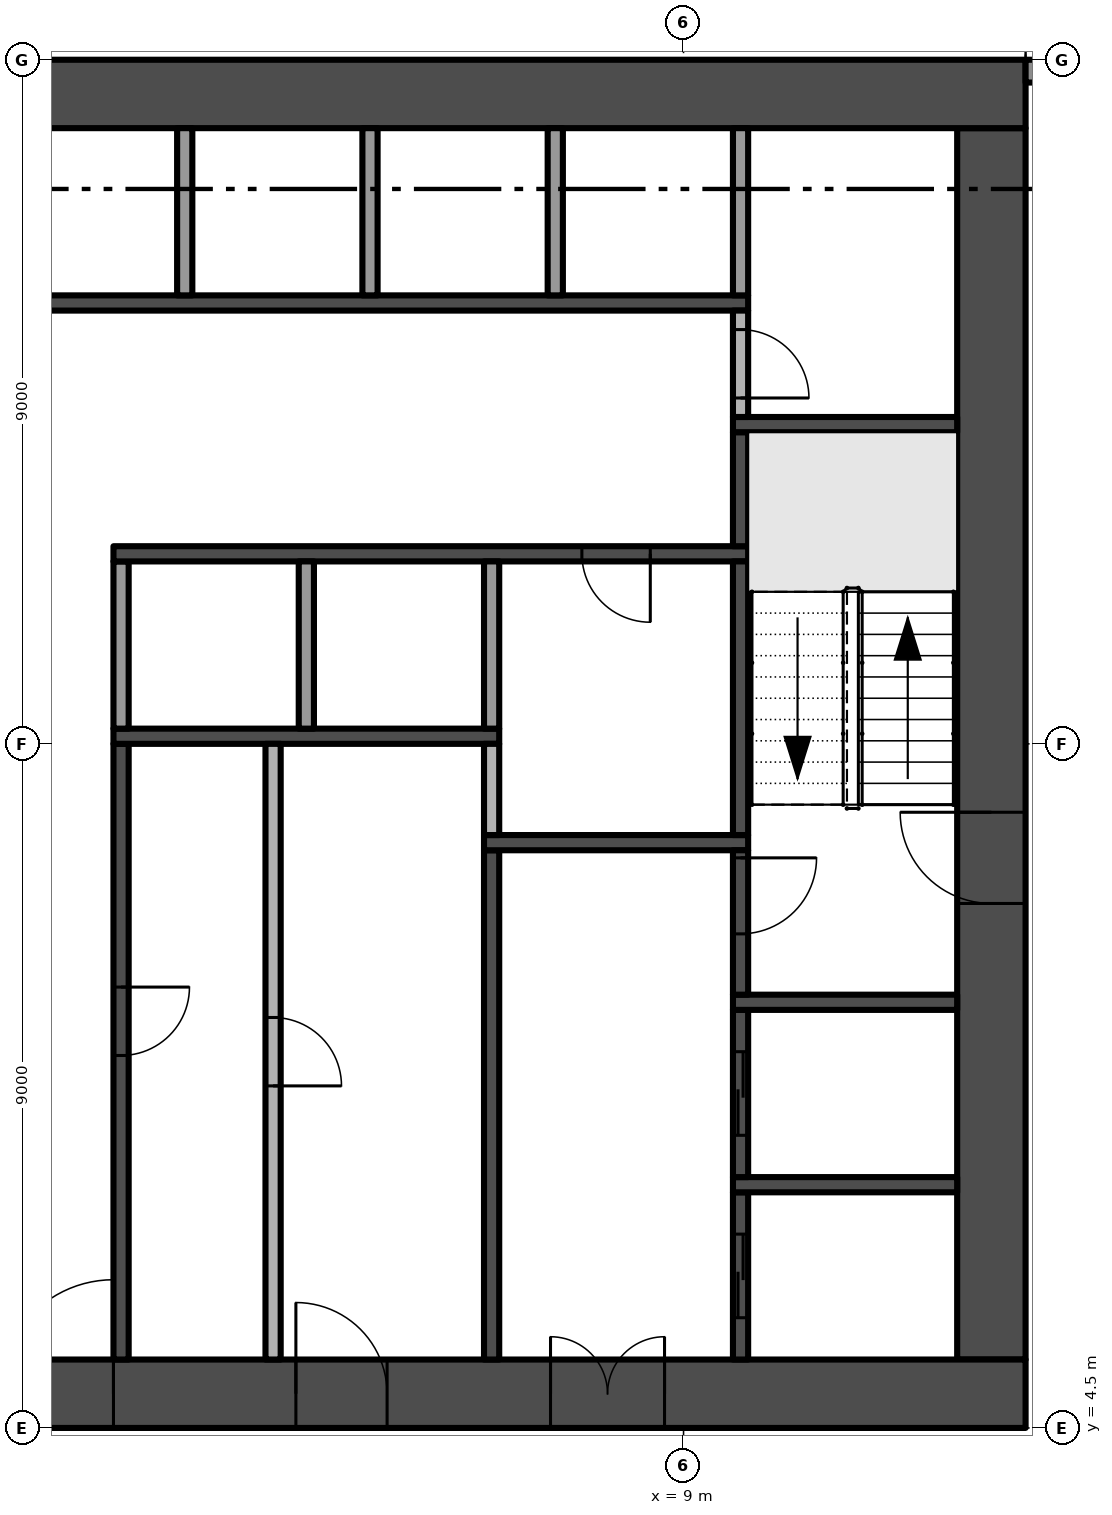
"""IFC4 building model, lengths in metres.
Left out: names, types, materials, properties, quantities, classifications, styles, units other than length and angle.
Written with IfcOpenShell. Run it as: python <this file> out.ifc"""

import sys

from ifc_helpers import new_model, si_unit, direction, frame, frame_2d, origin, place, context, subcontext, project, spatial, rectangle, extrude, element, fill, save


model = new_model("IFC4")
c1 = context("Model", 3, precision=1e-05, world=origin(), true_north=direction((0.0, 1.0)))
c2 = subcontext(c1, "Body", "Model", "MODEL_VIEW")
j1 = project(units=[si_unit("LENGTHUNIT", "METRE"), si_unit("PLANEANGLEUNIT", "RADIAN")], contexts=[c1])
p1 = place(None, origin())
s1 = spatial("IfcSite", under=j1, at=p1, CompositionType="ELEMENT")
p2 = place(p1, origin())
s2 = spatial("IfcBuilding", under=s1, at=p2, CompositionType="ELEMENT")
p3 = place(p2, frame((0.0, 0.0, 92.2)))
s3 = spatial("IfcBuildingStorey", under=s2, at=p3, CompositionType="ELEMENT", Elevation=92.2)
p4 = place(p3, frame((-13.5, 4.95, -0.3), z_axis=(0.0, 0.0, 1.0), x_axis=(1.0, 0.0, 0.0)))
e1 = element("IfcWall", 1, at=p4, inside=s3, PredefinedType="SHEAR", context=c2, shape_type="SweptSolid", body=[
    extrude(rectangle(XDim=27.0, YDim=0.9, at=frame_2d((13.5, 0.0))), origin(), (0.0, 0.0, 1.0), 3.8),
])
p5 = place(p4, frame((12.0, 0.0, 0.3)))
e2 = element("IfcOpeningElement", 2, at=p5, cuts=e1, PredefinedType="OPENING", context=c2, shape_type="SweptSolid", body=[
    extrude(rectangle(XDim=3.0, YDim=2.4, at=frame_2d((1.5, 1.2))), frame((0.0, 0.46, 0.0), z_axis=(0.0, -1.0, 0.0), x_axis=(1.0, 0.0, 0.0)), (0.0, 0.0, 1.0), 0.92),
])
p6 = place(p4, frame((4.9, 0.0, 0.3)))
e3 = element("IfcOpeningElement", 3, at=p6, cuts=e1, PredefinedType="OPENING", context=c2, shape_type="SweptSolid", body=[
    extrude(rectangle(XDim=1.2, YDim=2.2, at=frame_2d((0.6, 1.1))), frame((0.0, 0.46, 0.0), z_axis=(0.0, -1.0, 0.0), x_axis=(1.0, 0.0, 0.0)), (0.0, 0.0, 1.0), 0.92),
])
p7 = place(p4, frame((20.75, 0.0, 0.3)))
e4 = element("IfcOpeningElement", 4, at=p7, cuts=e1, PredefinedType="OPENING", context=c2, shape_type="SweptSolid", body=[
    extrude(rectangle(XDim=1.5, YDim=2.2, at=frame_2d((0.75, 1.1))), frame((0.0, 0.46, 0.0), z_axis=(0.0, -1.0, 0.0), x_axis=(1.0, 0.0, 0.0)), (0.0, 0.0, 1.0), 0.92),
])
p8 = place(p4, frame((17.4, 0.0, 0.3)))
e5 = element("IfcOpeningElement", 5, at=p8, cuts=e1, PredefinedType="OPENING", context=c2, shape_type="SweptSolid", body=[
    extrude(rectangle(XDim=1.2, YDim=2.2, at=frame_2d((0.6, 1.1))), frame((0.0, 0.46, 0.0), z_axis=(0.0, -1.0, 0.0), x_axis=(1.0, 0.0, 0.0)), (0.0, 0.0, 1.0), 0.92),
])
p9 = place(p3, frame((13.05, 5.4, -0.3), z_axis=(0.0, 0.0, 1.0), x_axis=(0.0, 1.0, 0.0)))
e6 = element("IfcWall", 6, at=p9, inside=s3, PredefinedType="SHEAR", context=c2, shape_type="SweptSolid", body=[
    extrude(rectangle(XDim=16.2, YDim=0.9, at=frame_2d((8.1, 0.0))), origin(), (0.0, 0.0, 1.0), 3.8),
])
p10 = place(p9, frame((6.0, 0.0, 0.3)))
e7 = element("IfcOpeningElement", 7, at=p10, cuts=e6, PredefinedType="OPENING", context=c2, shape_type="SweptSolid", body=[
    extrude(rectangle(XDim=1.2, YDim=2.2, at=frame_2d((0.6, 1.1))), frame((0.0, 0.46, 0.0), z_axis=(0.0, -1.0, 0.0), x_axis=(1.0, 0.0, 0.0)), (0.0, 0.0, 1.0), 0.92),
])
p11 = place(p3, frame((13.5, 22.05, -0.3), z_axis=(0.0, 0.0, 1.0), x_axis=(-1.0, 0.0, 0.0)))
e8 = element("IfcWall", 8, at=p11, inside=s3, PredefinedType="SHEAR", context=c2, shape_type="SweptSolid", body=[
    extrude(rectangle(XDim=27.0, YDim=0.9, at=frame_2d((13.5, 0.0))), origin(), (0.0, 0.0, 1.0), 3.8),
])
p12 = place(p3, frame((13.5, 22.35, 0.0), z_axis=(0.0, 0.0, 1.0), x_axis=(1.0, 0.0, 0.0)))
e9 = element("IfcWall", 9, at=p12, inside=s3, PredefinedType="SOLIDWALL", context=c2, shape_type="SweptSolid", body=[
    extrude(rectangle(XDim=3.85, YDim=0.3, at=frame_2d((1.925, 0.0))), origin(), (0.0, 0.0, 1.0), 3.5),
])
p13 = place(p12, frame((0.775, 0.0, 0.0)))
e10 = element("IfcOpeningElement", 10, at=p13, cuts=e9, PredefinedType="OPENING", context=c2, shape_type="SweptSolid", body=[
    extrude(rectangle(XDim=2.4, YDim=2.4, at=frame_2d((1.2, 1.2))), frame((0.0, 0.16, 0.0), z_axis=(0.0, -1.0, 0.0), x_axis=(1.0, 0.0, 0.0)), (0.0, 0.0, 1.0), 0.32),
])
p14 = place(p3, frame((-9.85, 19.3, 0.0), z_axis=(0.0, 0.0, 1.0), x_axis=(1.0, 0.0, 0.0)))
e11 = element("IfcWall", 11, at=p14, inside=s3, PredefinedType="SHEAR", context=c2, shape_type="SweptSolid", body=[
    extrude(rectangle(XDim=19.7, YDim=0.2, at=frame_2d((9.85, 0.0))), origin(), (0.0, 0.0, 1.0), 3.5),
])
p15 = place(p14, frame((0.769, 0.0, 0.0)))
e12 = element("IfcOpeningElement", 12, at=p15, cuts=e11, PredefinedType="OPENING", context=c2, shape_type="SweptSolid", body=[
    extrude(rectangle(XDim=1.1, YDim=2.1, at=frame_2d((0.55, 1.05))), frame((0.0, 0.11, 0.0), z_axis=(0.0, -1.0, 0.0), x_axis=(1.0, 0.0, 0.0)), (0.0, 0.0, 1.0), 0.22),
])
p16 = place(p14, frame((3.206, 0.0, 0.0)))
e13 = element("IfcOpeningElement", 13, at=p16, cuts=e11, PredefinedType="OPENING", context=c2, shape_type="SweptSolid", body=[
    extrude(rectangle(XDim=1.1, YDim=2.1, at=frame_2d((0.55, 1.05))), frame((0.0, 0.11, 0.0), z_axis=(0.0, -1.0, 0.0), x_axis=(1.0, 0.0, 0.0)), (0.0, 0.0, 1.0), 0.22),
])
p17 = place(p14, frame((5.644, 0.0, 0.0)))
e14 = element("IfcOpeningElement", 14, at=p17, cuts=e11, PredefinedType="OPENING", context=c2, shape_type="SweptSolid", body=[
    extrude(rectangle(XDim=1.1, YDim=2.1, at=frame_2d((0.55, 1.05))), frame((0.0, 0.11, 0.0), z_axis=(0.0, -1.0, 0.0), x_axis=(1.0, 0.0, 0.0)), (0.0, 0.0, 1.0), 0.22),
])
p18 = place(p14, frame((8.081, 0.0, 0.0)))
e15 = element("IfcOpeningElement", 15, at=p18, cuts=e11, PredefinedType="OPENING", context=c2, shape_type="SweptSolid", body=[
    extrude(rectangle(XDim=1.1, YDim=2.1, at=frame_2d((0.55, 1.05))), frame((0.0, 0.11, 0.0), z_axis=(0.0, -1.0, 0.0), x_axis=(1.0, 0.0, 0.0)), (0.0, 0.0, 1.0), 0.22),
])
p19 = place(p3, frame((1.6, 13.5, 0.0), z_axis=(0.0, 0.0, 1.0), x_axis=(0.0, -1.0, 0.0)))
e16 = element("IfcWall", 16, at=p19, inside=s3, PredefinedType="SHEAR", context=c2, shape_type="SweptSolid", body=[
    extrude(rectangle(XDim=8.1, YDim=0.2, at=frame_2d((4.05, 0.0))), origin(), (0.0, 0.0, 1.0), 3.5),
])
p20 = place(p19, frame((3.2, 0.0, 0.0)))
e17 = element("IfcOpeningElement", 17, at=p20, cuts=e16, PredefinedType="OPENING", context=c2, shape_type="SweptSolid", body=[
    extrude(rectangle(XDim=0.9, YDim=2.1, at=frame_2d((0.45, 1.05))), frame((0.0, 0.11, 0.0), z_axis=(0.0, -1.0, 0.0), x_axis=(1.0, 0.0, 0.0)), (0.0, 0.0, 1.0), 0.22),
])
p21 = place(p3, frame((1.5, 13.6, 0.0), z_axis=(0.0, 0.0, 1.0), x_axis=(1.0, 0.0, 0.0)))
e18 = element("IfcWall", 18, at=p21, inside=s3, PredefinedType="SHEAR", context=c2, shape_type="SweptSolid", body=[
    extrude(rectangle(XDim=5.075, YDim=0.2, at=frame_2d((2.538, 0.0))), origin(), (0.0, 0.0, 1.0), 3.5),
])
p22 = place(p3, frame((1.6, 13.7, 0.0), z_axis=(0.0, 0.0, 1.0), x_axis=(0.0, 1.0, 0.0)))
e19 = element("IfcWall", 19, at=p22, inside=s3, PredefinedType="PARTITIONING", context=c2, shape_type="SweptSolid", body=[
    extrude(rectangle(XDim=2.2, YDim=0.2, at=frame_2d((1.1, 0.0))), origin(), (0.0, 0.0, 1.0), 3.5),
])
p23 = place(p3, frame((9.85, 16.0, 0.0), z_axis=(0.0, 0.0, 1.0), x_axis=(-1.0, 0.0, 0.0)))
e20 = element("IfcWall", 20, at=p23, inside=s3, PredefinedType="SHEAR", context=c2, shape_type="SweptSolid", body=[
    extrude(rectangle(XDim=8.35, YDim=0.2, at=frame_2d((4.175, 0.0))), origin(), (0.0, 0.0, 1.0), 3.5),
])
p24 = place(p23, frame((1.288, 0.0, 0.0)))
e21 = element("IfcOpeningElement", 21, at=p24, cuts=e20, PredefinedType="OPENING", context=c2, shape_type="SweptSolid", body=[
    extrude(rectangle(XDim=0.9, YDim=2.1, at=frame_2d((0.45, 1.05))), frame((0.0, 0.11, 0.0), z_axis=(0.0, -1.0, 0.0), x_axis=(1.0, 0.0, 0.0)), (0.0, 0.0, 1.0), 0.22),
])
p25 = place(p3, frame((2.438, 19.4, 0.0), z_axis=(0.0, 0.0, 1.0), x_axis=(0.0, 1.0, 0.0)))
e22 = element("IfcWall", 22, at=p25, inside=s3, PredefinedType="PARTITIONING", context=c2, shape_type="SweptSolid", body=[
    extrude(rectangle(XDim=2.2, YDim=0.2, at=frame_2d((1.1, 0.0))), origin(), (0.0, 0.0, 1.0), 3.5),
])
p26 = place(p3, frame((3.6, 13.5, 0.0), z_axis=(0.0, 0.0, 1.0), x_axis=(0.0, -1.0, 0.0)))
e23 = element("IfcWall", 23, at=p26, inside=s3, PredefinedType="PARTITIONING", context=c2, shape_type="SweptSolid", body=[
    extrude(rectangle(XDim=8.1, YDim=0.2, at=frame_2d((4.05, 0.0))), origin(), (0.0, 0.0, 1.0), 3.5),
])
p27 = place(p26, frame((3.6, 0.0, 0.0)))
e24 = element("IfcOpeningElement", 24, at=p27, cuts=e23, PredefinedType="OPENING", context=c2, shape_type="SweptSolid", body=[
    extrude(rectangle(XDim=0.9, YDim=2.1, at=frame_2d((0.45, 1.05))), frame((0.0, 0.11, 0.0), z_axis=(0.0, -1.0, 0.0), x_axis=(1.0, 0.0, 0.0)), (0.0, 0.0, 1.0), 0.22),
])
for number, where, z_axis, x_axis in (
    (25, (4.037, 13.7, 0.0), (0.0, 0.0, 1.0), (0.0, 1.0, 0.0)),
    (26, (4.875, 19.4, 0.0), (0.0, 0.0, 1.0), (0.0, 1.0, 0.0)),
):
    element("IfcWall", number, at=place(p3, frame(where, z_axis=z_axis, x_axis=x_axis)), inside=s3, PredefinedType="PARTITIONING", context=c2, shape_type="SweptSolid", body=[
        extrude(rectangle(XDim=2.2, YDim=0.2, at=frame_2d((1.1, 0.0))), origin(), (0.0, 0.0, 1.0), 3.5),
    ])
p28 = place(p3, frame((6.475, 5.4, 0.0), z_axis=(0.0, 0.0, 1.0), x_axis=(0.0, 1.0, 0.0)))
e27 = element("IfcWall", 27, at=p28, inside=s3, PredefinedType="SHEAR", context=c2, shape_type="SweptSolid", body=[
    extrude(rectangle(XDim=6.7, YDim=0.2, at=frame_2d((3.35, 0.0))), origin(), (0.0, 0.0, 1.0), 3.5),
])
p29 = place(p3, frame((6.375, 12.2, 0.0), z_axis=(0.0, 0.0, 1.0), x_axis=(1.0, 0.0, 0.0)))
e28 = element("IfcWall", 28, at=p29, inside=s3, PredefinedType="SHEAR", context=c2, shape_type="SweptSolid", body=[
    extrude(rectangle(XDim=3.475, YDim=0.2, at=frame_2d((1.738, 0.0))), origin(), (0.0, 0.0, 1.0), 3.5),
])
p30 = place(p3, frame((6.475, 12.3, 0.0), z_axis=(0.0, 0.0, 1.0), x_axis=(0.0, 1.0, 0.0)))
e29 = element("IfcWall", 29, at=p30, inside=s3, PredefinedType="PARTITIONING", context=c2, shape_type="SweptSolid", body=[
    extrude(rectangle(XDim=1.2, YDim=0.2, at=frame_2d((0.6, 0.0))), origin(), (0.0, 0.0, 1.0), 3.5),
])
for number, where, z_axis, x_axis in (
    (30, (6.475, 13.7, 0.0), (0.0, 0.0, 1.0), (0.0, 1.0, 0.0)),
    (31, (7.312, 19.4, 0.0), (0.0, 0.0, 1.0), (0.0, 1.0, 0.0)),
):
    element("IfcWall", number, at=place(p3, frame(where, z_axis=z_axis, x_axis=x_axis)), inside=s3, PredefinedType="PARTITIONING", context=c2, shape_type="SweptSolid", body=[
        extrude(rectangle(XDim=2.2, YDim=0.2, at=frame_2d((1.1, 0.0))), origin(), (0.0, 0.0, 1.0), 3.5),
    ])
p31 = place(p3, frame((9.75, 5.4, 0.0), z_axis=(0.0, 0.0, 1.0), x_axis=(0.0, 1.0, 0.0)))
e32 = element("IfcWall", 32, at=p31, inside=s3, PredefinedType="SHEAR", context=c2, shape_type="SweptSolid", body=[
    extrude(rectangle(XDim=2.2, YDim=0.2, at=frame_2d((1.1, 0.0))), origin(), (0.0, 0.0, 1.0), 3.5),
])
p32 = place(p31, frame((0.55, 0.0, 0.0)))
e33 = element("IfcOpeningElement", 33, at=p32, cuts=e32, PredefinedType="OPENING", context=c2, shape_type="SweptSolid", body=[
    extrude(rectangle(XDim=1.1, YDim=2.1, at=frame_2d((0.55, 1.05))), frame((0.0, 0.11, 0.0), z_axis=(0.0, -1.0, 0.0), x_axis=(1.0, 0.0, 0.0)), (0.0, 0.0, 1.0), 0.22),
])
p33 = place(p3, frame((9.65, 7.7, 0.0), z_axis=(0.0, 0.0, 1.0), x_axis=(1.0, 0.0, 0.0)))
e34 = element("IfcWall", 34, at=p33, inside=s3, PredefinedType="SHEAR", context=c2, shape_type="SweptSolid", body=[
    extrude(rectangle(XDim=2.95, YDim=0.2, at=frame_2d((1.475, 0.0))), origin(), (0.0, 0.0, 1.0), 3.5),
])
p34 = place(p3, frame((9.75, 7.8, 0.0), z_axis=(0.0, 0.0, 1.0), x_axis=(0.0, 1.0, 0.0)))
e35 = element("IfcWall", 35, at=p34, inside=s3, PredefinedType="SHEAR", context=c2, shape_type="SweptSolid", body=[
    extrude(rectangle(XDim=2.2, YDim=0.2, at=frame_2d((1.1, 0.0))), origin(), (0.0, 0.0, 1.0), 3.5),
])
p35 = place(p34, frame((0.55, 0.0, 0.0)))
e36 = element("IfcOpeningElement", 36, at=p35, cuts=e35, PredefinedType="OPENING", context=c2, shape_type="SweptSolid", body=[
    extrude(rectangle(XDim=1.1, YDim=2.1, at=frame_2d((0.55, 1.05))), frame((0.0, 0.11, 0.0), z_axis=(0.0, -1.0, 0.0), x_axis=(1.0, 0.0, 0.0)), (0.0, 0.0, 1.0), 0.22),
])
p36 = place(p3, frame((9.65, 10.1, 0.0), z_axis=(0.0, 0.0, 1.0), x_axis=(1.0, 0.0, 0.0)))
e37 = element("IfcWall", 37, at=p36, inside=s3, PredefinedType="SHEAR", context=c2, shape_type="SweptSolid", body=[
    extrude(rectangle(XDim=2.95, YDim=0.2, at=frame_2d((1.475, 0.0))), origin(), (0.0, 0.0, 1.0), 3.5),
])
p37 = place(p3, frame((9.75, 12.1, 0.0), z_axis=(0.0, 0.0, 1.0), x_axis=(0.0, -1.0, 0.0)))
e38 = element("IfcWall", 38, at=p37, inside=s3, PredefinedType="SHEAR", context=c2, shape_type="SweptSolid", body=[
    extrude(rectangle(XDim=1.9, YDim=0.2, at=frame_2d((0.95, 0.0))), origin(), (0.0, 0.0, 1.0), 3.5),
])
p38 = place(p37, frame((0.1, 0.0, 0.0)))
e39 = element("IfcOpeningElement", 39, at=p38, cuts=e38, PredefinedType="OPENING", context=c2, shape_type="SweptSolid", body=[
    extrude(rectangle(XDim=1.0, YDim=2.2, at=frame_2d((0.5, 1.1))), frame((0.0, 0.11, 0.0), z_axis=(0.0, -1.0, 0.0), x_axis=(1.0, 0.0, 0.0)), (0.0, 0.0, 1.0), 0.22),
])
p39 = place(p3, frame((9.75, 12.3, 0.0), z_axis=(0.0, 0.0, 1.0), x_axis=(0.0, 1.0, 0.0)))
e40 = element("IfcWall", 40, at=p39, inside=s3, PredefinedType="SHEAR", context=c2, shape_type="SweptSolid", body=[
    extrude(rectangle(XDim=3.6, YDim=0.2, at=frame_2d((1.8, 0.0))), origin(), (0.0, 0.0, 1.0), 3.5),
])
p40 = place(p3, frame((9.75, 16.1, 0.0), z_axis=(0.0, 0.0, 1.0), x_axis=(0.0, 1.0, 0.0)))
e41 = element("IfcWall", 41, at=p40, inside=s3, PredefinedType="SHEAR", context=c2, shape_type="SweptSolid", body=[
    extrude(rectangle(XDim=1.5, YDim=0.2, at=frame_2d((0.75, 0.0))), origin(), (0.0, 0.0, 1.0), 3.5),
])
p41 = place(p3, frame((9.65, 17.7, 0.0), z_axis=(0.0, 0.0, 1.0), x_axis=(1.0, 0.0, 0.0)))
e42 = element("IfcWall", 42, at=p41, inside=s3, PredefinedType="SHEAR", context=c2, shape_type="SweptSolid", body=[
    extrude(rectangle(XDim=2.95, YDim=0.2, at=frame_2d((1.475, 0.0))), origin(), (0.0, 0.0, 1.0), 3.5),
])
p42 = place(p3, frame((9.75, 19.2, 0.0), z_axis=(0.0, 0.0, 1.0), x_axis=(0.0, -1.0, 0.0)))
e43 = element("IfcWall", 43, at=p42, inside=s3, PredefinedType="PARTITIONING", context=c2, shape_type="SweptSolid", body=[
    extrude(rectangle(XDim=1.4, YDim=0.2, at=frame_2d((0.7, 0.0))), origin(), (0.0, 0.0, 1.0), 3.5),
])
p43 = place(p42, frame((0.25, 0.0, 0.0)))
e44 = element("IfcOpeningElement", 44, at=p43, cuts=e43, PredefinedType="OPENING", context=c2, shape_type="SweptSolid", body=[
    extrude(rectangle(XDim=0.9, YDim=2.1, at=frame_2d((0.45, 1.05))), frame((0.0, 0.11, 0.0), z_axis=(0.0, -1.0, 0.0), x_axis=(1.0, 0.0, 0.0)), (0.0, 0.0, 1.0), 0.22),
])
p44 = place(p3, frame((9.75, 19.4, 0.0), z_axis=(0.0, 0.0, 1.0), x_axis=(0.0, 1.0, 0.0)))
e45 = element("IfcWall", 45, at=p44, inside=s3, PredefinedType="PARTITIONING", context=c2, shape_type="SweptSolid", body=[
    extrude(rectangle(XDim=2.2, YDim=0.2, at=frame_2d((1.1, 0.0))), origin(), (0.0, 0.0, 1.0), 3.5),
])
p45 = place(p5, frame((3.0, 0.0, 0.0), z_axis=(0.0, 0.0, 1.0), x_axis=(-1.0, 0.0, 0.0)))
e46 = element("IfcDoor", 46, at=p45, inside=s3, OperationType="DOUBLE_DOOR_SINGLE_SWING", PredefinedType="DOOR", context=c2, shape_type="SweptSolid", body=[
    extrude(rectangle(XDim=3.0, YDim=2.4, at=frame_2d((1.5, 1.2))), frame((0.0, 0.025, 0.0), z_axis=(0.0, -1.0, 0.0), x_axis=(1.0, 0.0, 0.0)), (0.0, 0.0, 1.0), 0.05),
])
fill(e2, e46)
p46 = place(p10, frame((1.2, 0.0, 0.0), z_axis=(0.0, 0.0, 1.0), x_axis=(-1.0, 0.0, 0.0)))
e47 = element("IfcDoor", 47, at=p46, inside=s3, OperationType="SINGLE_SWING_LEFT", PredefinedType="DOOR", context=c2, shape_type="SweptSolid", body=[
    extrude(rectangle(XDim=1.2, YDim=2.2, at=frame_2d((0.6, 1.1))), frame((0.0, 0.025, 0.0), z_axis=(0.0, -1.0, 0.0), x_axis=(1.0, 0.0, 0.0)), (0.0, 0.0, 1.0), 0.05),
])
fill(e7, e47)
p47 = place(p7, frame((1.5, 0.0, 0.0), z_axis=(0.0, 0.0, 1.0), x_axis=(-1.0, 0.0, 0.0)))
e48 = element("IfcDoor", 48, at=p47, inside=s3, OperationType="DOUBLE_DOOR_SINGLE_SWING", PredefinedType="DOOR", context=c2, shape_type="SweptSolid", body=[
    extrude(rectangle(XDim=1.5, YDim=2.2, at=frame_2d((0.75, 1.1))), frame((0.0, 0.025, 0.0), z_axis=(0.0, -1.0, 0.0), x_axis=(1.0, 0.0, 0.0)), (0.0, 0.0, 1.0), 0.05),
])
fill(e4, e48)
p48 = place(p8, frame((1.2, 0.0, 0.0), z_axis=(0.0, 0.0, 1.0), x_axis=(-1.0, 0.0, 0.0)))
e49 = element("IfcDoor", 49, at=p48, inside=s3, OperationType="SINGLE_SWING_RIGHT", PredefinedType="DOOR", context=c2, shape_type="SweptSolid", body=[
    extrude(rectangle(XDim=1.2, YDim=2.2, at=frame_2d((0.6, 1.1))), frame((0.0, 0.025, 0.0), z_axis=(0.0, -1.0, 0.0), x_axis=(1.0, 0.0, 0.0)), (0.0, 0.0, 1.0), 0.05),
])
fill(e5, e49)
p49 = place(p38, origin())
e50 = element("IfcDoor", 50, at=p49, inside=s3, OperationType="SINGLE_SWING_LEFT", PredefinedType="DOOR", context=c2, shape_type="SweptSolid", body=[
    extrude(rectangle(XDim=1.0, YDim=2.2, at=frame_2d((0.5, 1.1))), frame((0.0, 0.025, 0.0), z_axis=(0.0, -1.0, 0.0), x_axis=(1.0, 0.0, 0.0)), (0.0, 0.0, 1.0), 0.05),
])
fill(e39, e50)
p50 = place(p32, origin())
e51 = element("IfcDoor", 51, at=p50, inside=s3, OperationType="SLIDING_TO_RIGHT", PredefinedType="DOOR", context=c2, shape_type="SweptSolid", body=[
    extrude(rectangle(XDim=1.1, YDim=2.1, at=frame_2d((0.55, 1.05))), frame((0.0, 0.025, 0.0), z_axis=(0.0, -1.0, 0.0), x_axis=(1.0, 0.0, 0.0)), (0.0, 0.0, 1.0), 0.05),
])
fill(e33, e51)
p51 = place(p35, origin())
e52 = element("IfcDoor", 52, at=p51, inside=s3, OperationType="SLIDING_TO_RIGHT", PredefinedType="DOOR", context=c2, shape_type="SweptSolid", body=[
    extrude(rectangle(XDim=1.1, YDim=2.1, at=frame_2d((0.55, 1.05))), frame((0.0, 0.025, 0.0), z_axis=(0.0, -1.0, 0.0), x_axis=(1.0, 0.0, 0.0)), (0.0, 0.0, 1.0), 0.05),
])
fill(e36, e52)
p52 = place(p20, origin())
e53 = element("IfcDoor", 53, at=p52, inside=s3, OperationType="SINGLE_SWING_LEFT", PredefinedType="DOOR", context=c2, shape_type="SweptSolid", body=[
    extrude(rectangle(XDim=0.9, YDim=2.1, at=frame_2d((0.45, 1.05))), frame((0.0, 0.025, 0.0), z_axis=(0.0, -1.0, 0.0), x_axis=(1.0, 0.0, 0.0)), (0.0, 0.0, 1.0), 0.05),
])
fill(e17, e53)
p53 = place(p24, origin())
e54 = element("IfcDoor", 54, at=p53, inside=s3, OperationType="SINGLE_SWING_LEFT", PredefinedType="DOOR", context=c2, shape_type="SweptSolid", body=[
    extrude(rectangle(XDim=0.9, YDim=2.1, at=frame_2d((0.45, 1.05))), frame((0.0, 0.025, 0.0), z_axis=(0.0, -1.0, 0.0), x_axis=(1.0, 0.0, 0.0)), (0.0, 0.0, 1.0), 0.05),
])
fill(e21, e54)
p54 = place(p43, origin())
e55 = element("IfcDoor", 55, at=p54, inside=s3, OperationType="SINGLE_SWING_RIGHT", PredefinedType="DOOR", context=c2, shape_type="SweptSolid", body=[
    extrude(rectangle(XDim=0.9, YDim=2.1, at=frame_2d((0.45, 1.05))), frame((0.0, 0.025, 0.0), z_axis=(0.0, -1.0, 0.0), x_axis=(1.0, 0.0, 0.0)), (0.0, 0.0, 1.0), 0.05),
])
fill(e44, e55)
p55 = place(p27, origin())
e56 = element("IfcDoor", 56, at=p55, inside=s3, OperationType="SINGLE_SWING_RIGHT", PredefinedType="DOOR", context=c2, shape_type="SweptSolid", body=[
    extrude(rectangle(XDim=0.9, YDim=2.1, at=frame_2d((0.45, 1.05))), frame((0.0, 0.025, 0.0), z_axis=(0.0, -1.0, 0.0), x_axis=(1.0, 0.0, 0.0)), (0.0, 0.0, 1.0), 0.05),
])
fill(e24, e56)
save(model, sys.argv[1])
